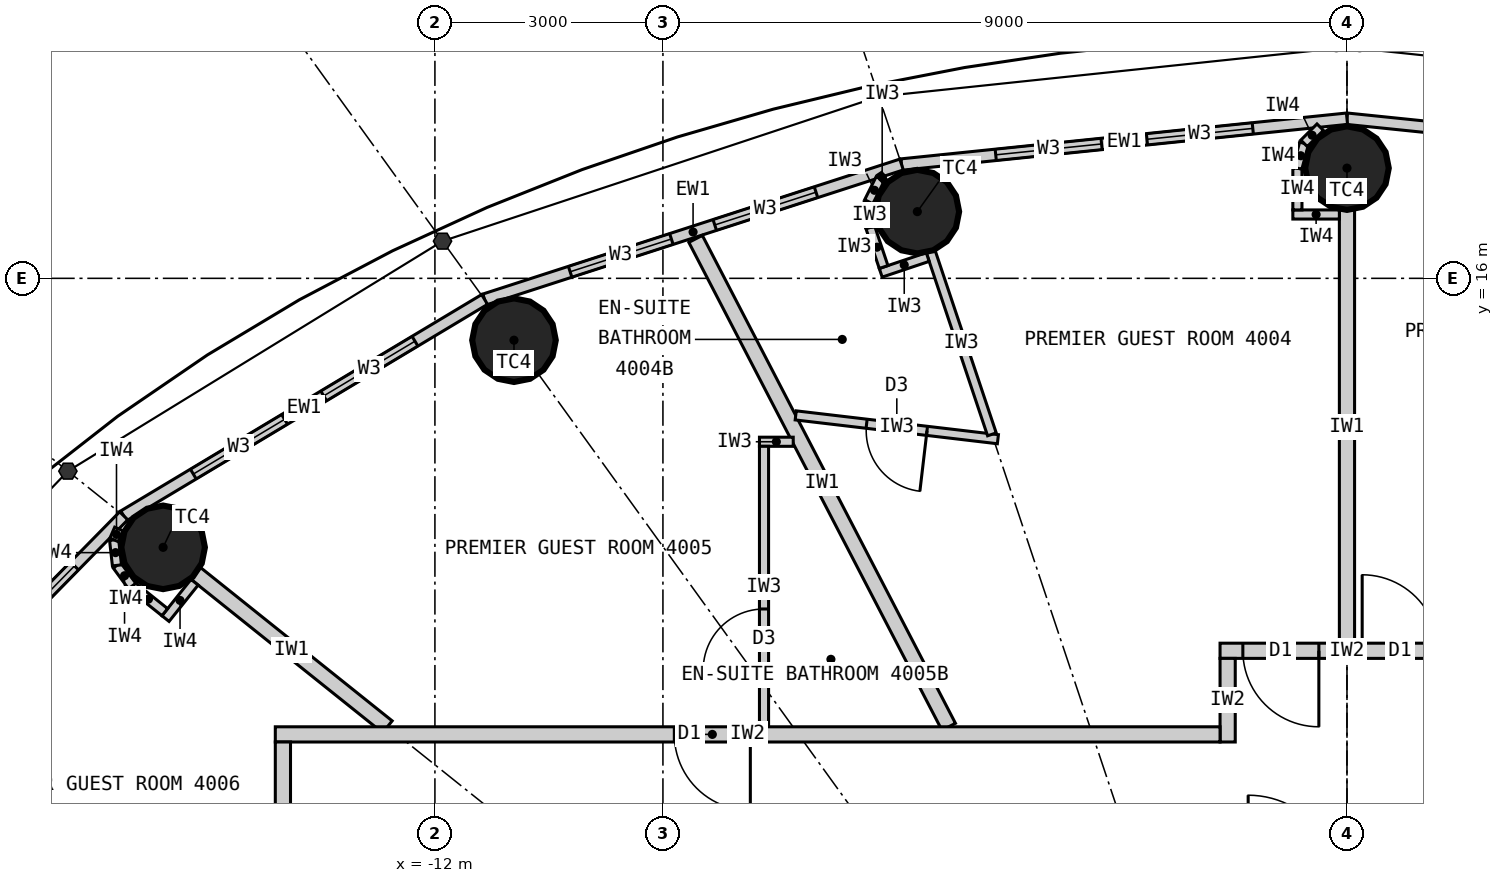
"""IFC4 building model, lengths in metres.
Left out: names, types, materials, properties, quantities, classifications, styles, units other than length and angle.
Written with IfcOpenShell. Run it as: python <this file> out.ifc"""

import sys

from ifc_helpers import new_model, si_unit, direction, frame, frame_2d, origin, origin_2d, place, context, subcontext, project, spatial, rectangle, circle, extrude, element, fill, save


model = new_model("IFC4")
c1 = context("Model", 3, precision=1e-05, world=origin(), true_north=direction((0.0, 1.0)))
c2 = subcontext(c1, "Body", "Model", "MODEL_VIEW")
j1 = project(units=[si_unit("LENGTHUNIT", "METRE"), si_unit("PLANEANGLEUNIT", "RADIAN")], contexts=[c1])
p1 = place(None, origin())
s1 = spatial("IfcSite", under=j1, at=p1, CompositionType="ELEMENT")
p2 = place(p1, origin())
s2 = spatial("IfcBuilding", under=s1, at=p2, CompositionType="ELEMENT")
p3 = place(p2, frame((0.0, 0.0, 153.3)))
s3 = spatial("IfcBuildingStorey", under=s2, at=p3, CompositionType="ELEMENT", Elevation=153.3)
for number, where, z_axis, x_axis in (
    (1, (0.0, 17.45, 0.0), (0.0, 0.0, 1.0), (1.0, 0.0, 0.0)),
    (2, (-5.653, 16.877, 0.0), (0.0, 0.0, 1.0), (1.0, 0.0, 0.0)),
    (3, (-10.96, 15.186, 0.0), (0.0, 0.0, 1.0), (1.0, 0.0, 0.0)),
    (4, (-15.576, 12.461, 0.0), (0.0, 0.0, 1.0), (1.0, 0.0, 0.0)),
):
    element("IfcColumn", number, at=place(p3, frame(where, z_axis=z_axis, x_axis=x_axis)), inside=s3, PredefinedType="COLUMN", context=c2, shape_type="SweptSolid", body=[
        extrude(circle(Radius=0.55, at=origin_2d()), origin(), (0.0, 0.0, 1.0), 3.3),
    ])
p4 = place(p3, frame((5.86, 17.497, 0.0), z_axis=(0.0, 0.0, 1.0), x_axis=(-0.994751738032, 0.102318032045, 0.0)))
e5 = element("IfcWall", 5, at=p4, inside=s3, PredefinedType="ELEMENTEDWALL", context=c2, shape_type="SweptSolid", body=[
    extrude(rectangle(XDim=5.891, YDim=0.15, at=frame_2d((2.946, 0.0))), origin(), (0.0, 0.0, 1.0), 3.12),
])
p5 = place(p4, frame((1.246, 0.0, 0.9)))
e6 = element("IfcOpeningElement", 6, at=p5, cuts=e5, PredefinedType="OPENING", context=c2, shape_type="SweptSolid", body=[
    extrude(rectangle(XDim=1.4, YDim=1.9, at=frame_2d((0.7, 0.95))), frame((0.0, 0.085, 0.0), z_axis=(0.0, -1.0, 0.0), x_axis=(1.0, 0.0, 0.0)), (0.0, 0.0, 1.0), 0.17),
])
p6 = place(p4, frame((3.246, 0.0, 0.9)))
e7 = element("IfcOpeningElement", 7, at=p6, cuts=e5, PredefinedType="OPENING", context=c2, shape_type="SweptSolid", body=[
    extrude(rectangle(XDim=1.4, YDim=1.9, at=frame_2d((0.7, 0.95))), frame((0.0, 0.085, 0.0), z_axis=(0.0, -1.0, 0.0), x_axis=(1.0, 0.0, 0.0)), (0.0, 0.0, 1.0), 0.17),
])
p7 = place(p3, frame((0.0, 18.1, 0.0), z_axis=(0.0, 0.0, 1.0), x_axis=(-0.994751738032, -0.102318032045, 0.0)))
e8 = element("IfcWall", 8, at=p7, inside=s3, PredefinedType="ELEMENTEDWALL", context=c2, shape_type="SweptSolid", body=[
    extrude(rectangle(XDim=5.891, YDim=0.15, at=frame_2d((2.946, 0.0))), origin(), (0.0, 0.0, 1.0), 3.12),
])
p8 = place(p7, frame((1.246, 0.0, 0.9)))
e9 = element("IfcOpeningElement", 9, at=p8, cuts=e8, PredefinedType="OPENING", context=c2, shape_type="SweptSolid", body=[
    extrude(rectangle(XDim=1.4, YDim=1.9, at=frame_2d((0.7, 0.95))), frame((0.0, 0.085, 0.0), z_axis=(0.0, -1.0, 0.0), x_axis=(1.0, 0.0, 0.0)), (0.0, 0.0, 1.0), 0.17),
])
p9 = place(p7, frame((3.246, 0.0, 0.9)))
e10 = element("IfcOpeningElement", 10, at=p9, cuts=e8, PredefinedType="OPENING", context=c2, shape_type="SweptSolid", body=[
    extrude(rectangle(XDim=1.4, YDim=1.9, at=frame_2d((0.7, 0.95))), frame((0.0, 0.085, 0.0), z_axis=(0.0, -1.0, 0.0), x_axis=(1.0, 0.0, 0.0)), (0.0, 0.0, 1.0), 0.17),
])
p10 = place(p3, frame((-5.86, 17.497, 0.0), z_axis=(0.0, 0.0, 1.0), x_axis=(-0.951432482129, -0.307857486429, 0.0)))
e11 = element("IfcWall", 11, at=p10, inside=s3, PredefinedType="ELEMENTEDWALL", context=c2, shape_type="SweptSolid", body=[
    extrude(rectangle(XDim=5.766, YDim=0.15, at=frame_2d((2.883, 0.0))), origin(), (0.0, 0.0, 1.0), 3.12),
])
p11 = place(p10, frame((1.183, 0.0, 0.9)))
e12 = element("IfcOpeningElement", 12, at=p11, cuts=e11, PredefinedType="OPENING", context=c2, shape_type="SweptSolid", body=[
    extrude(rectangle(XDim=1.4, YDim=1.9, at=frame_2d((0.7, 0.95))), frame((0.0, 0.085, 0.0), z_axis=(0.0, -1.0, 0.0), x_axis=(1.0, 0.0, 0.0)), (0.0, 0.0, 1.0), 0.17),
])
p12 = place(p10, frame((3.183, 0.0, 0.9)))
e13 = element("IfcOpeningElement", 13, at=p12, cuts=e11, PredefinedType="OPENING", context=c2, shape_type="SweptSolid", body=[
    extrude(rectangle(XDim=1.4, YDim=1.9, at=frame_2d((0.7, 0.95))), frame((0.0, 0.085, 0.0), z_axis=(0.0, -1.0, 0.0), x_axis=(1.0, 0.0, 0.0)), (0.0, 0.0, 1.0), 0.17),
])
p13 = place(p3, frame((-11.346, 15.722, 0.0), z_axis=(0.0, 0.0, 1.0), x_axis=(-0.857695199231, -0.514158482587, 0.0)))
e14 = element("IfcWall", 14, at=p13, inside=s3, PredefinedType="ELEMENTEDWALL", context=c2, shape_type="SweptSolid", body=[
    extrude(rectangle(XDim=5.536, YDim=0.15, at=frame_2d((2.768, 0.0))), origin(), (0.0, 0.0, 1.0), 3.12),
])
p14 = place(p13, frame((1.068, 0.0, 0.9)))
e15 = element("IfcOpeningElement", 15, at=p14, cuts=e14, PredefinedType="OPENING", context=c2, shape_type="SweptSolid", body=[
    extrude(rectangle(XDim=1.4, YDim=1.9, at=frame_2d((0.7, 0.95))), frame((0.0, 0.085, 0.0), z_axis=(0.0, -1.0, 0.0), x_axis=(1.0, 0.0, 0.0)), (0.0, 0.0, 1.0), 0.17),
])
p15 = place(p13, frame((3.068, 0.0, 0.9)))
e16 = element("IfcOpeningElement", 16, at=p15, cuts=e14, PredefinedType="OPENING", context=c2, shape_type="SweptSolid", body=[
    extrude(rectangle(XDim=1.4, YDim=1.9, at=frame_2d((0.7, 0.95))), frame((0.0, 0.085, 0.0), z_axis=(0.0, -1.0, 0.0), x_axis=(1.0, 0.0, 0.0)), (0.0, 0.0, 1.0), 0.17),
])
p16 = place(p3, frame((-16.095, 12.876, 0.0), z_axis=(0.0, 0.0, 1.0), x_axis=(-0.700727467776, -0.71342905457, 0.0)))
e17 = element("IfcWall", 17, at=p16, inside=s3, PredefinedType="ELEMENTEDWALL", context=c2, shape_type="SweptSolid", body=[
    extrude(rectangle(XDim=5.247, YDim=0.15, at=frame_2d((2.624, 0.0))), origin(), (0.0, 0.0, 1.0), 3.12),
])
p17 = place(p16, frame((0.924, 0.0, 0.9)))
e18 = element("IfcOpeningElement", 18, at=p17, cuts=e17, PredefinedType="OPENING", context=c2, shape_type="SweptSolid", body=[
    extrude(rectangle(XDim=1.4, YDim=1.9, at=frame_2d((0.7, 0.95))), frame((0.0, 0.085, 0.0), z_axis=(0.0, -1.0, 0.0), x_axis=(1.0, 0.0, 0.0)), (0.0, 0.0, 1.0), 0.17),
])
p18 = place(p16, frame((2.924, 0.0, 0.9)))
e19 = element("IfcOpeningElement", 19, at=p18, cuts=e17, PredefinedType="OPENING", context=c2, shape_type="SweptSolid", body=[
    extrude(rectangle(XDim=1.4, YDim=1.9, at=frame_2d((0.7, 0.95))), frame((0.0, 0.085, 0.0), z_axis=(0.0, -1.0, 0.0), x_axis=(1.0, 0.0, 0.0)), (0.0, 0.0, 1.0), 0.17),
])
p19 = place(p3, frame((0.0, 11.2, 0.0), z_axis=(0.0, 0.0, 1.0), x_axis=(0.0, 1.0, 0.0)))
e20 = element("IfcWall", 20, at=p19, inside=s3, PredefinedType="PARTITIONING", context=c2, shape_type="SweptSolid", body=[
    extrude(rectangle(XDim=5.7, YDim=0.2, at=frame_2d((2.85, 0.0))), origin(), (0.0, 0.0, 1.0), 2.42),
])
p20 = place(p3, frame((-5.24, 10.1, 0.0), z_axis=(0.0, 0.0, 1.0), x_axis=(-0.460532965373, 0.887642601391, 0.0)))
e21 = element("IfcWall", 21, at=p20, inside=s3, PredefinedType="PARTITIONING", context=c2, shape_type="SweptSolid", body=[
    extrude(rectangle(XDim=7.231, YDim=0.2, at=frame_2d((3.616, 0.0))), origin(), (0.0, 0.0, 1.0), 3.12),
])
p21 = place(p3, frame((-12.625, 10.1, 0.0), z_axis=(0.0, 0.0, 1.0), x_axis=(-0.780876185034, 0.624685827954, 0.0)))
e22 = element("IfcWall", 22, at=p21, inside=s3, PredefinedType="PARTITIONING", context=c2, shape_type="SweptSolid", body=[
    extrude(rectangle(XDim=3.229, YDim=0.2, at=frame_2d((1.615, 0.0))), origin(), (0.0, 0.0, 1.0), 2.42),
])
p22 = place(p3, frame((-1.67, 11.1, 0.0), z_axis=(0.0, 0.0, 1.0), x_axis=(1.0, 0.0, 0.0)))
e23 = element("IfcWall", 23, at=p22, inside=s3, PredefinedType="PARTITIONING", context=c2, shape_type="SweptSolid", body=[
    extrude(rectangle(XDim=3.34, YDim=0.2, at=frame_2d((1.67, 0.0))), origin(), (0.0, 0.0, 1.0), 3.12),
])
p23 = place(p22, frame((1.87, 0.0, 0.0)))
e24 = element("IfcOpeningElement", 24, at=p23, cuts=e23, PredefinedType="OPENING", context=c2, shape_type="SweptSolid", body=[
    extrude(rectangle(XDim=1.0, YDim=2.2, at=frame_2d((0.5, 1.1))), frame((0.0, 0.11, 0.0), z_axis=(0.0, -1.0, 0.0), x_axis=(1.0, 0.0, 0.0)), (0.0, 0.0, 1.0), 0.22),
])
p24 = place(p22, frame((0.3, 0.0, 0.0)))
e25 = element("IfcOpeningElement", 25, at=p24, cuts=e23, PredefinedType="OPENING", context=c2, shape_type="SweptSolid", body=[
    extrude(rectangle(XDim=1.0, YDim=2.2, at=frame_2d((0.5, 1.1))), frame((0.0, 0.11, 0.0), z_axis=(0.0, -1.0, 0.0), x_axis=(1.0, 0.0, 0.0)), (0.0, 0.0, 1.0), 0.22),
])
p25 = place(p3, frame((-1.57, 9.9, 0.0), z_axis=(0.0, 0.0, 1.0), x_axis=(0.0, 1.0, 0.0)))
e26 = element("IfcWall", 26, at=p25, inside=s3, PredefinedType="PARTITIONING", context=c2, shape_type="SweptSolid", body=[
    extrude(rectangle(XDim=1.1, YDim=0.2, at=frame_2d((0.55, 0.0))), origin(), (0.0, 0.0, 1.0), 3.12),
])
p26 = place(p3, frame((-7.253, 14.197, 0.0), z_axis=(0.0, 0.0, 1.0), x_axis=(0.993128188393, -0.117031625725, 0.0)))
e27 = element("IfcWall", 27, at=p26, inside=s3, PredefinedType="PARTITIONING", context=c2, shape_type="SweptSolid", body=[
    extrude(rectangle(XDim=2.678, YDim=0.12, at=frame_2d((1.339, 0.0))), origin(), (0.0, 0.0, 1.0), 3.12),
])
p27 = place(p26, frame((0.939, 0.0, 0.0)))
e28 = element("IfcOpeningElement", 28, at=p27, cuts=e27, PredefinedType="OPENING", context=c2, shape_type="SweptSolid", body=[
    extrude(rectangle(XDim=0.8, YDim=2.1, at=frame_2d((0.4, 1.05))), frame((0.0, 0.07, 0.0), z_axis=(0.0, -1.0, 0.0), x_axis=(1.0, 0.0, 0.0)), (0.0, 0.0, 1.0), 0.14),
])
p28 = place(p3, frame((-4.671, 13.948, 0.0), z_axis=(0.0, 0.0, 1.0), x_axis=(-0.317669167093, 0.948201613729, 0.0)))
e29 = element("IfcWall", 29, at=p28, inside=s3, PredefinedType="PARTITIONING", context=c2, shape_type="SweptSolid", body=[
    extrude(rectangle(XDim=2.54, YDim=0.12, at=frame_2d((1.27, 0.0))), origin(), (0.0, 0.0, 1.0), 2.42),
])
p29 = place(p3, frame((-5.516, 16.28, 0.0), z_axis=(0.0, 0.0, 1.0), x_axis=(-0.948157944392, -0.317799484717, 0.0)))
e30 = element("IfcWall", 30, at=p29, inside=s3, PredefinedType="PARTITIONING", context=c2, shape_type="SweptSolid", body=[
    extrude(rectangle(XDim=0.652, YDim=0.12, at=frame_2d((0.326, 0.0))), origin(), (0.0, 0.0, 1.0), 3.12),
])
p30 = place(p3, frame((-6.097, 16.149, 0.0), z_axis=(0.0, 0.0, 1.0), x_axis=(-0.317292604854, 0.948327687514, 0.0)))
e31 = element("IfcWall", 31, at=p30, inside=s3, PredefinedType="PARTITIONING", context=c2, shape_type="SweptSolid", body=[
    extrude(rectangle(XDim=0.55, YDim=0.12, at=frame_2d((0.275, 0.0))), origin(), (0.0, 0.0, 1.0), 3.12),
])
for number, where, z_axis, x_axis in (
    (32, (-6.271, 16.67, 0.0), (0.0, 0.0, 1.0), (-0.061, 0.998, 0.0)),
    (33, (-6.292, 17.007, 0.0), (0.0, 0.0, 1.0), (0.445, 0.895, 0.0)),
):
    element("IfcWall", number, at=place(p3, frame(where, z_axis=z_axis, x_axis=x_axis)), inside=s3, PredefinedType="PARTITIONING", context=c2, shape_type="SweptSolid", body=[
        extrude(rectangle(XDim=0.338, YDim=0.12, at=frame_2d((0.169, 0.0))), origin(), (0.0, 0.0, 1.0), 3.12),
    ])
p31 = place(p3, frame((-6.142, 17.31, 0.0), z_axis=(0.0, 0.0, 1.0), x_axis=(0.835039693181, 0.550189704386, 0.0)))
e34 = element("IfcWall", 34, at=p31, inside=s3, PredefinedType="PARTITIONING", context=c2, shape_type="SweptSolid", body=[
    extrude(rectangle(XDim=0.062, YDim=0.12, at=frame_2d((0.031, 0.0))), origin(), (0.0, 0.0, 1.0), 3.12),
])
p32 = place(p3, frame((-7.286, 13.85, 0.0), z_axis=(0.0, 0.0, 1.0), x_axis=(-1.0, 0.0, 0.0)))
e35 = element("IfcWall", 35, at=p32, inside=s3, PredefinedType="PARTITIONING", context=c2, shape_type="SweptSolid", body=[
    extrude(rectangle(XDim=0.444, YDim=0.12, at=frame_2d((0.222, 0.0))), origin(), (0.0, 0.0, 1.0), 3.12),
])
p33 = place(p3, frame((-7.67, 10.1, 0.0), z_axis=(0.0, 0.0, 1.0), x_axis=(0.0, 1.0, 0.0)))
e36 = element("IfcWall", 36, at=p33, inside=s3, PredefinedType="PARTITIONING", context=c2, shape_type="SweptSolid", body=[
    extrude(rectangle(XDim=3.69, YDim=0.12, at=frame_2d((1.845, 0.0))), origin(), (0.0, 0.0, 1.0), 3.12),
])
p34 = place(p33, frame((0.75, 0.0, 0.0)))
e37 = element("IfcOpeningElement", 37, at=p34, cuts=e36, PredefinedType="OPENING", context=c2, shape_type="SweptSolid", body=[
    extrude(rectangle(XDim=0.8, YDim=2.1, at=frame_2d((0.4, 1.05))), frame((0.0, 0.07, 0.0), z_axis=(0.0, -1.0, 0.0), x_axis=(1.0, 0.0, 0.0)), (0.0, 0.0, 1.0), 0.14),
])
p35 = place(p3, frame((-14.1, 10.0, 0.0), z_axis=(0.0, 0.0, 1.0), x_axis=(1.0, 0.0, 0.0)))
e38 = element("IfcWall", 38, at=p35, inside=s3, PredefinedType="PARTITIONING", context=c2, shape_type="SweptSolid", body=[
    extrude(rectangle(XDim=12.43, YDim=0.2, at=frame_2d((6.215, 0.0))), origin(), (0.0, 0.0, 1.0), 3.12),
])
p36 = place(p35, frame((5.25, 0.0, 0.0)))
e39 = element("IfcOpeningElement", 39, at=p36, cuts=e38, PredefinedType="OPENING", context=c2, shape_type="SweptSolid", body=[
    extrude(rectangle(XDim=1.0, YDim=2.2, at=frame_2d((0.5, 1.1))), frame((0.0, 0.11, 0.0), z_axis=(0.0, -1.0, 0.0), x_axis=(1.0, 0.0, 0.0)), (0.0, 0.0, 1.0), 0.22),
])
p37 = place(p3, frame((-14.0, 9.9, 0.0), z_axis=(0.0, 0.0, 1.0), x_axis=(0.0, -1.0, 0.0)))
e40 = element("IfcWall", 40, at=p37, inside=s3, PredefinedType="PARTITIONING", context=c2, shape_type="SweptSolid", body=[
    extrude(rectangle(XDim=8.23, YDim=0.2, at=frame_2d((4.115, 0.0))), origin(), (0.0, 0.0, 1.0), 3.12),
])
p38 = place(p37, frame((1.678, 0.0, 0.0)))
e41 = element("IfcOpeningElement", 41, at=p38, cuts=e40, PredefinedType="OPENING", context=c2, shape_type="SweptSolid", body=[
    extrude(rectangle(XDim=1.0, YDim=2.2, at=frame_2d((0.5, 1.1))), frame((0.0, 0.11, 0.0), z_axis=(0.0, -1.0, 0.0), x_axis=(1.0, 0.0, 0.0)), (0.0, 0.0, 1.0), 0.22),
])
p39 = place(p3, frame((-0.1, 16.84, 0.0), z_axis=(0.0, 0.0, 1.0), x_axis=(-1.0, 0.0, 0.0)))
e42 = element("IfcWall", 42, at=p39, inside=s3, PredefinedType="PARTITIONING", context=c2, shape_type="SweptSolid", body=[
    extrude(rectangle(XDim=0.612, YDim=0.12, at=frame_2d((0.306, 0.0))), origin(), (0.0, 0.0, 1.0), 3.12),
])
p40 = place(p3, frame((-0.652, 16.9, 0.0), z_axis=(0.0, 0.0, 1.0), x_axis=(0.0, 1.0, 0.0)))
e43 = element("IfcWall", 43, at=p40, inside=s3, PredefinedType="PARTITIONING", context=c2, shape_type="SweptSolid", body=[
    extrude(rectangle(XDim=0.55, YDim=0.12, at=frame_2d((0.275, 0.0))), origin(), (0.0, 0.0, 1.0), 3.12),
])
p41 = place(p3, frame((-0.652, 17.45, 0.0), z_axis=(0.0, 0.0, 1.0), x_axis=(0.258832454679, 0.965922233104, 0.0)))
e44 = element("IfcWall", 44, at=p41, inside=s3, PredefinedType="PARTITIONING", context=c2, shape_type="SweptSolid", body=[
    extrude(rectangle(XDim=0.338, YDim=0.12, at=frame_2d((0.169, 0.0))), origin(), (0.0, 0.0, 1.0), 3.12),
])
p42 = place(p3, frame((-0.565, 17.776, 0.0), z_axis=(0.0, 0.0, 1.0), x_axis=(0.707106781187, 0.707106781187, 0.0)))
e45 = element("IfcWall", 45, at=p42, inside=s3, PredefinedType="PARTITIONING", context=c2, shape_type="SweptSolid", body=[
    extrude(rectangle(XDim=0.301, YDim=0.12, at=frame_2d((0.15, 0.0))), origin(), (0.0, 0.0, 1.0), 3.12),
])
p43 = place(p3, frame((-15.162, 12.002, 0.0), z_axis=(0.0, 0.0, 1.0), x_axis=(-0.624597762427, -0.780946627607, 0.0)))
e46 = element("IfcWall", 46, at=p43, inside=s3, PredefinedType="PARTITIONING", context=c2, shape_type="SweptSolid", body=[
    extrude(rectangle(XDim=0.612, YDim=0.12, at=frame_2d((0.306, 0.0))), origin(), (0.0, 0.0, 1.0), 3.12),
])
p44 = place(p3, frame((-15.554, 11.608, 0.0), z_axis=(0.0, 0.0, 1.0), x_axis=(-0.780695577787, 0.624911525597, 0.0)))
e47 = element("IfcWall", 47, at=p44, inside=s3, PredefinedType="PARTITIONING", context=c2, shape_type="SweptSolid", body=[
    extrude(rectangle(XDim=0.55, YDim=0.12, at=frame_2d((0.275, 0.0))), origin(), (0.0, 0.0, 1.0), 3.12),
])
p45 = place(p3, frame((-15.984, 11.952, 0.0), z_axis=(0.0, 0.0, 1.0), x_axis=(-0.592335221171, 0.805691619517, 0.0)))
e48 = element("IfcWall", 48, at=p45, inside=s3, PredefinedType="PARTITIONING", context=c2, shape_type="SweptSolid", body=[
    extrude(rectangle(XDim=0.338, YDim=0.12, at=frame_2d((0.169, 0.0))), origin(), (0.0, 0.0, 1.0), 3.12),
])
p46 = place(p3, frame((-16.184, 12.224, 0.0), z_axis=(0.0, 0.0, 1.0), x_axis=(-0.110669692975, 0.993857242795, 0.0)))
e49 = element("IfcWall", 49, at=p46, inside=s3, PredefinedType="PARTITIONING", context=c2, shape_type="SweptSolid", body=[
    extrude(rectangle(XDim=0.337, YDim=0.12, at=frame_2d((0.169, 0.0))), origin(), (0.0, 0.0, 1.0), 3.12),
])
p47 = place(p3, frame((-16.221, 12.559, 0.0), z_axis=(0.0, 0.0, 1.0), x_axis=(0.401064416249, 0.916049853457, 0.0)))
e50 = element("IfcWall", 50, at=p47, inside=s3, PredefinedType="PARTITIONING", context=c2, shape_type="SweptSolid", body=[
    extrude(rectangle(XDim=0.156, YDim=0.12, at=frame_2d((0.078, 0.0))), origin(), (0.0, 0.0, 1.0), 3.12),
])
p48 = place(p8, origin())
e51 = element("IfcWindow", 51, at=p48, inside=s3, PartitioningType="SINGLE_PANEL", PredefinedType="WINDOW", context=c2, shape_type="SweptSolid", body=[
    extrude(rectangle(XDim=1.4, YDim=1.9, at=frame_2d((0.7, 0.95))), frame((0.0, 0.03, 0.0), z_axis=(0.0, -1.0, 0.0), x_axis=(1.0, 0.0, 0.0)), (0.0, 0.0, 1.0), 0.06),
])
fill(e9, e51)
p49 = place(p9, origin())
e52 = element("IfcWindow", 52, at=p49, inside=s3, PartitioningType="SINGLE_PANEL", PredefinedType="WINDOW", context=c2, shape_type="SweptSolid", body=[
    extrude(rectangle(XDim=1.4, YDim=1.9, at=frame_2d((0.7, 0.95))), frame((0.0, 0.03, 0.0), z_axis=(0.0, -1.0, 0.0), x_axis=(1.0, 0.0, 0.0)), (0.0, 0.0, 1.0), 0.06),
])
fill(e10, e52)
p50 = place(p11, origin())
e53 = element("IfcWindow", 53, at=p50, inside=s3, PartitioningType="SINGLE_PANEL", PredefinedType="WINDOW", context=c2, shape_type="SweptSolid", body=[
    extrude(rectangle(XDim=1.4, YDim=1.9, at=frame_2d((0.7, 0.95))), frame((0.0, 0.03, 0.0), z_axis=(0.0, -1.0, 0.0), x_axis=(1.0, 0.0, 0.0)), (0.0, 0.0, 1.0), 0.06),
])
fill(e12, e53)
p51 = place(p12, origin())
e54 = element("IfcWindow", 54, at=p51, inside=s3, PartitioningType="SINGLE_PANEL", PredefinedType="WINDOW", context=c2, shape_type="SweptSolid", body=[
    extrude(rectangle(XDim=1.4, YDim=1.9, at=frame_2d((0.7, 0.95))), frame((0.0, 0.03, 0.0), z_axis=(0.0, -1.0, 0.0), x_axis=(1.0, 0.0, 0.0)), (0.0, 0.0, 1.0), 0.06),
])
fill(e13, e54)
p52 = place(p14, origin())
e55 = element("IfcWindow", 55, at=p52, inside=s3, PartitioningType="SINGLE_PANEL", PredefinedType="WINDOW", context=c2, shape_type="SweptSolid", body=[
    extrude(rectangle(XDim=1.4, YDim=1.9, at=frame_2d((0.7, 0.95))), frame((0.0, 0.03, 0.0), z_axis=(0.0, -1.0, 0.0), x_axis=(1.0, 0.0, 0.0)), (0.0, 0.0, 1.0), 0.06),
])
fill(e15, e55)
p53 = place(p15, origin())
e56 = element("IfcWindow", 56, at=p53, inside=s3, PartitioningType="SINGLE_PANEL", PredefinedType="WINDOW", context=c2, shape_type="SweptSolid", body=[
    extrude(rectangle(XDim=1.4, YDim=1.9, at=frame_2d((0.7, 0.95))), frame((0.0, 0.03, 0.0), z_axis=(0.0, -1.0, 0.0), x_axis=(1.0, 0.0, 0.0)), (0.0, 0.0, 1.0), 0.06),
])
fill(e16, e56)
p54 = place(p17, origin())
e57 = element("IfcWindow", 57, at=p54, inside=s3, PartitioningType="SINGLE_PANEL", PredefinedType="WINDOW", context=c2, shape_type="SweptSolid", body=[
    extrude(rectangle(XDim=1.4, YDim=1.9, at=frame_2d((0.7, 0.95))), frame((0.0, 0.03, 0.0), z_axis=(0.0, -1.0, 0.0), x_axis=(1.0, 0.0, 0.0)), (0.0, 0.0, 1.0), 0.06),
])
fill(e18, e57)
p55 = place(p23, origin())
e58 = element("IfcDoor", 58, at=p55, inside=s3, OperationType="SINGLE_SWING_LEFT", PredefinedType="DOOR", context=c2, shape_type="SweptSolid", body=[
    extrude(rectangle(XDim=1.0, YDim=2.2, at=frame_2d((0.5, 1.1))), frame((0.0, 0.025, 0.0), z_axis=(0.0, -1.0, 0.0), x_axis=(1.0, 0.0, 0.0)), (0.0, 0.0, 1.0), 0.05),
])
fill(e24, e58)
p56 = place(p27, origin())
e59 = element("IfcDoor", 59, at=p56, inside=s3, OperationType="SINGLE_SWING_RIGHT", PredefinedType="DOOR", context=c2, shape_type="SweptSolid", body=[
    extrude(rectangle(XDim=0.8, YDim=2.1, at=frame_2d((0.4, 1.05))), frame((0.0, 0.025, 0.0), z_axis=(0.0, -1.0, 0.0), x_axis=(1.0, 0.0, 0.0)), (0.0, 0.0, 1.0), 0.05),
])
fill(e28, e59)
p57 = place(p24, origin())
e60 = element("IfcDoor", 60, at=p57, inside=s3, OperationType="SINGLE_SWING_RIGHT", PredefinedType="DOOR", context=c2, shape_type="SweptSolid", body=[
    extrude(rectangle(XDim=1.0, YDim=2.2, at=frame_2d((0.5, 1.1))), frame((0.0, 0.025, 0.0), z_axis=(0.0, -1.0, 0.0), x_axis=(1.0, 0.0, 0.0)), (0.0, 0.0, 1.0), 0.05),
])
fill(e25, e60)
p58 = place(p34, origin())
e61 = element("IfcDoor", 61, at=p58, inside=s3, OperationType="SINGLE_SWING_LEFT", PredefinedType="DOOR", context=c2, shape_type="SweptSolid", body=[
    extrude(rectangle(XDim=0.8, YDim=2.1, at=frame_2d((0.4, 1.05))), frame((0.0, 0.025, 0.0), z_axis=(0.0, -1.0, 0.0), x_axis=(1.0, 0.0, 0.0)), (0.0, 0.0, 1.0), 0.05),
])
fill(e37, e61)
p59 = place(p36, origin())
e62 = element("IfcDoor", 62, at=p59, inside=s3, OperationType="SINGLE_SWING_RIGHT", PredefinedType="DOOR", context=c2, shape_type="SweptSolid", body=[
    extrude(rectangle(XDim=1.0, YDim=2.2, at=frame_2d((0.5, 1.1))), frame((0.0, 0.025, 0.0), z_axis=(0.0, -1.0, 0.0), x_axis=(1.0, 0.0, 0.0)), (0.0, 0.0, 1.0), 0.05),
])
fill(e39, e62)
save(model, sys.argv[1])
